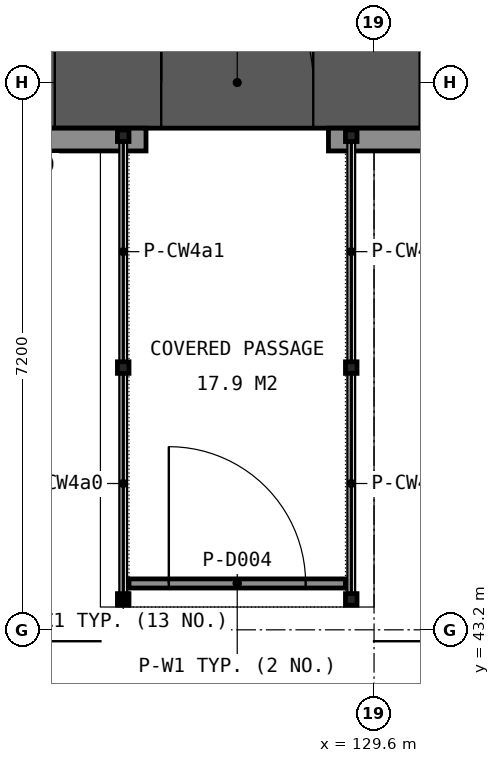
"""IFC4 building model, lengths in metres.
Left out: names, types, materials, properties, quantities, classifications, styles, units other than length and angle.
Written with IfcOpenShell. Run it as: python <this file> out.ifc"""

import sys

from ifc_helpers import new_model, si_unit, direction, frame, frame_2d, origin, origin_2d, place, context, subcontext, project, spatial, rectangle, hollow_rectangle, extrude, element, fill, save


model = new_model("IFC4")
c1 = context("Model", 3, precision=1e-05, world=origin(), true_north=direction((0.0, 1.0)))
c2 = subcontext(c1, "Body", "Model", "MODEL_VIEW")
j1 = project(units=[si_unit("LENGTHUNIT", "METRE"), si_unit("PLANEANGLEUNIT", "RADIAN")], contexts=[c1])
p1 = place(None, origin())
s1 = spatial("IfcSite", under=j1, at=p1, CompositionType="ELEMENT")
p2 = place(p1, origin())
s2 = spatial("IfcBuilding", under=s1, at=p2, CompositionType="ELEMENT")
p3 = place(p2, frame((0.0, 0.0, 4.8)))
s3 = spatial("IfcBuildingStorey", under=s2, at=p3, CompositionType="ELEMENT", Elevation=4.8)
p4 = place(p3, frame((123.0, 50.4, 0.0), z_axis=(0.0, 0.0, 1.0), x_axis=(1.0, 0.0, 0.0)))
e1 = element("IfcWall", 1, at=p4, inside=s3, PredefinedType="SOLIDWALL", context=c2, shape_type="SweptSolid", body=[
    extrude(rectangle(XDim=13.2, YDim=1.2, at=frame_2d((6.6, 0.0))), origin(), (0.0, 0.0, 1.0), 4.8),
])
p5 = place(p4, frame((3.8, 0.0, 0.0)))
e2 = element("IfcOpeningElement", 2, at=p5, cuts=e1, PredefinedType="OPENING", context=c2, shape_type="SweptSolid", body=[
    extrude(rectangle(XDim=2.0, YDim=2.4, at=frame_2d((1.0, 1.2))), frame((0.0, 0.61, 0.0), z_axis=(0.0, -1.0, 0.0), x_axis=(1.0, 0.0, 0.0)), (0.0, 0.0, 1.0), 1.22),
])
p6 = place(p4, frame((0.0, 0.0, 1.2)))
e3 = element("IfcOpeningElement", 3, at=p6, cuts=e1, PredefinedType="OPENING", context=c2, shape_type="SweptSolid", body=[
    extrude(rectangle(XDim=0.9, YDim=3.0, at=frame_2d((0.45, 1.5))), frame((0.0, 0.61, 0.0), z_axis=(0.0, -1.0, 0.0), x_axis=(1.0, 0.0, 0.0)), (0.0, 0.0, 1.0), 1.22),
])
p7 = place(p4, frame((1.5, 0.0, 1.2)))
e4 = element("IfcOpeningElement", 4, at=p7, cuts=e1, PredefinedType="OPENING", context=c2, shape_type="SweptSolid", body=[
    extrude(rectangle(XDim=0.9, YDim=3.0, at=frame_2d((0.45, 1.5))), frame((0.0, 0.61, 0.0), z_axis=(0.0, -1.0, 0.0), x_axis=(1.0, 0.0, 0.0)), (0.0, 0.0, 1.0), 1.22),
])
p8 = place(p4, frame((7.2, 0.0, 1.2)))
e5 = element("IfcOpeningElement", 5, at=p8, cuts=e1, PredefinedType="OPENING", context=c2, shape_type="SweptSolid", body=[
    extrude(rectangle(XDim=0.9, YDim=3.0, at=frame_2d((0.45, 1.5))), frame((0.0, 0.61, 0.0), z_axis=(0.0, -1.0, 0.0), x_axis=(1.0, 0.0, 0.0)), (0.0, 0.0, 1.0), 1.22),
])
p9 = place(p4, frame((8.7, 0.0, 1.2)))
e6 = element("IfcOpeningElement", 6, at=p9, cuts=e1, PredefinedType="OPENING", context=c2, shape_type="SweptSolid", body=[
    extrude(rectangle(XDim=0.9, YDim=3.0, at=frame_2d((0.45, 1.5))), frame((0.0, 0.61, 0.0), z_axis=(0.0, -1.0, 0.0), x_axis=(1.0, 0.0, 0.0)), (0.0, 0.0, 1.0), 1.22),
])
p10 = place(p4, frame((10.8, 0.0, 1.2)))
e7 = element("IfcOpeningElement", 7, at=p10, cuts=e1, PredefinedType="OPENING", context=c2, shape_type="SweptSolid", body=[
    extrude(rectangle(XDim=0.9, YDim=3.0, at=frame_2d((0.45, 1.5))), frame((0.0, 0.61, 0.0), z_axis=(0.0, -1.0, 0.0), x_axis=(1.0, 0.0, 0.0)), (0.0, 0.0, 1.0), 1.22),
])
p11 = place(p4, frame((12.3, 0.0, 1.2)))
e8 = element("IfcOpeningElement", 8, at=p11, cuts=e1, PredefinedType="OPENING", context=c2, shape_type="SweptSolid", body=[
    extrude(rectangle(XDim=0.9, YDim=3.0, at=frame_2d((0.45, 1.5))), frame((0.0, 0.61, 0.0), z_axis=(0.0, -1.0, 0.0), x_axis=(1.0, 0.0, 0.0)), (0.0, 0.0, 1.0), 1.22),
])
for number, where, z_axis, x_axis in (
    (9, (126.3, 43.6, 0.0), (0.0, 0.0, 1.0), (1.0, 0.0, 0.0)),
    (10, (126.3, 46.65, 0.0), (0.0, 0.0, 1.0), (1.0, 0.0, 0.0)),
    (11, (126.3, 49.7, 0.0), (0.0, 0.0, 1.0), (1.0, 0.0, 0.0)),
    (12, (129.3, 43.6, 0.0), (0.0, 0.0, 1.0), (1.0, 0.0, 0.0)),
    (13, (129.3, 46.65, 0.0), (0.0, 0.0, 1.0), (1.0, 0.0, 0.0)),
    (14, (129.3, 49.7, 0.0), (0.0, 0.0, 1.0), (1.0, 0.0, 0.0)),
):
    element("IfcColumn", number, at=place(p3, frame(where, z_axis=z_axis, x_axis=x_axis)), inside=s3, PredefinedType="COLUMN", context=c2, shape_type="SweptSolid", body=[
        extrude(hollow_rectangle(XDim=0.152, YDim=0.152, WallThickness=0.01, at=origin_2d()), origin(), (0.0, 0.0, 1.0), 2.753),
    ])
p12 = place(p3, frame((123.0, 49.65, 0.0), z_axis=(0.0, 0.0, 1.0), x_axis=(1.0, 0.0, 0.0)))
e15 = element("IfcWall", 15, at=p12, inside=s3, PredefinedType="SOLIDWALL", context=c2, shape_type="SweptSolid", body=[
    extrude(rectangle(XDim=3.6, YDim=0.3, at=frame_2d((1.8, 0.0))), origin(), (0.0, 0.0, 1.0), 1.2),
])
p13 = place(p3, frame((129.0, 49.65, 0.0), z_axis=(0.0, 0.0, 1.0), x_axis=(1.0, 0.0, 0.0)))
e16 = element("IfcWall", 16, at=p13, inside=s3, PredefinedType="SOLIDWALL", context=c2, shape_type="SweptSolid", body=[
    extrude(rectangle(XDim=7.2, YDim=0.3, at=frame_2d((3.6, 0.0))), origin(), (0.0, 0.0, 1.0), 1.2),
])
p14 = place(p3, frame((126.376, 43.81, 0.0), z_axis=(0.0, 0.0, 1.0), x_axis=(1.0, 0.0, 0.0)))
e17 = element("IfcWall", 17, at=p14, inside=s3, PredefinedType="SOLIDWALL", context=c2, shape_type="SweptSolid", body=[
    extrude(rectangle(XDim=2.848, YDim=0.12, at=frame_2d((1.424, 0.0))), origin(), (0.0, 0.0, 1.0), 2.753),
])
p15 = place(p14, frame((0.524, 0.0, 0.0)))
e18 = element("IfcOpeningElement", 18, at=p15, cuts=e17, PredefinedType="OPENING", context=c2, shape_type="SweptSolid", body=[
    extrude(rectangle(XDim=1.8, YDim=2.4, at=frame_2d((0.9, 1.2))), frame((0.0, 0.07, 0.0), z_axis=(0.0, -1.0, 0.0), x_axis=(1.0, 0.0, 0.0)), (0.0, 0.0, 1.0), 0.14),
])
p16 = place(p3, frame((75.6, 42.8, 0.0), z_axis=(0.0, 0.0, 1.0), x_axis=(1.0, 0.0, 0.0)))
e19 = element("IfcWall", 19, at=p16, inside=s3, PredefinedType="SOLIDWALL", context=c2, shape_type="SweptSolid", body=[
    extrude(rectangle(XDim=50.4, YDim=0.3, at=frame_2d((25.2, 0.0))), origin(), (0.0, 0.0, 1.0), 0.8),
])
p17 = place(p3, frame((129.6, 42.8, 0.0), z_axis=(0.0, 0.0, 1.0), x_axis=(1.0, 0.0, 0.0)))
e20 = element("IfcWall", 20, at=p17, inside=s3, PredefinedType="SOLIDWALL", context=c2, shape_type="SweptSolid", body=[
    extrude(rectangle(XDim=21.45, YDim=0.3, at=frame_2d((10.725, 0.0))), origin(), (0.0, 0.0, 1.0), 0.8),
])
p18 = place(p5, origin())
e21 = element("IfcDoor", 21, at=p18, inside=s3, OperationType="DOUBLE_DOOR_SINGLE_SWING", PredefinedType="DOOR", context=c2, shape_type="SweptSolid", body=[
    extrude(rectangle(XDim=2.0, YDim=2.4, at=frame_2d((1.0, 1.2))), frame((0.0, 0.025, 0.0), z_axis=(0.0, -1.0, 0.0), x_axis=(1.0, 0.0, 0.0)), (0.0, 0.0, 1.0), 0.05),
])
fill(e2, e21)
p19 = place(p7, origin())
e22 = element("IfcWindow", 22, at=p19, inside=s3, PartitioningType="SINGLE_PANEL", PredefinedType="WINDOW", context=c2, shape_type="SweptSolid", body=[
    extrude(rectangle(XDim=0.9, YDim=3.0, at=frame_2d((0.45, 1.5))), frame((0.0, -0.55, 0.0), z_axis=(0.0, -1.0, 0.0), x_axis=(1.0, 0.0, 0.0)), (0.0, 0.0, 1.0), 0.06),
])
fill(e4, e22)
p20 = place(p8, origin())
e23 = element("IfcWindow", 23, at=p20, inside=s3, PartitioningType="SINGLE_PANEL", PredefinedType="WINDOW", context=c2, shape_type="SweptSolid", body=[
    extrude(rectangle(XDim=0.9, YDim=3.0, at=frame_2d((0.45, 1.5))), frame((0.0, -0.55, 0.0), z_axis=(0.0, -1.0, 0.0), x_axis=(1.0, 0.0, 0.0)), (0.0, 0.0, 1.0), 0.06),
])
fill(e5, e23)
p21 = place(p15, origin())
e24 = element("IfcDoor", 24, at=p21, inside=s3, OperationType="DOUBLE_DOOR_DOUBLE_SWING", PredefinedType="DOOR", context=c2, shape_type="SweptSolid", body=[
    extrude(rectangle(XDim=1.8, YDim=2.4, at=frame_2d((0.9, 1.2))), frame((0.0, 0.025, 0.0), z_axis=(0.0, -1.0, 0.0), x_axis=(1.0, 0.0, 0.0)), (0.0, 0.0, 1.0), 0.05),
])
fill(e18, e24)
save(model, sys.argv[1])
